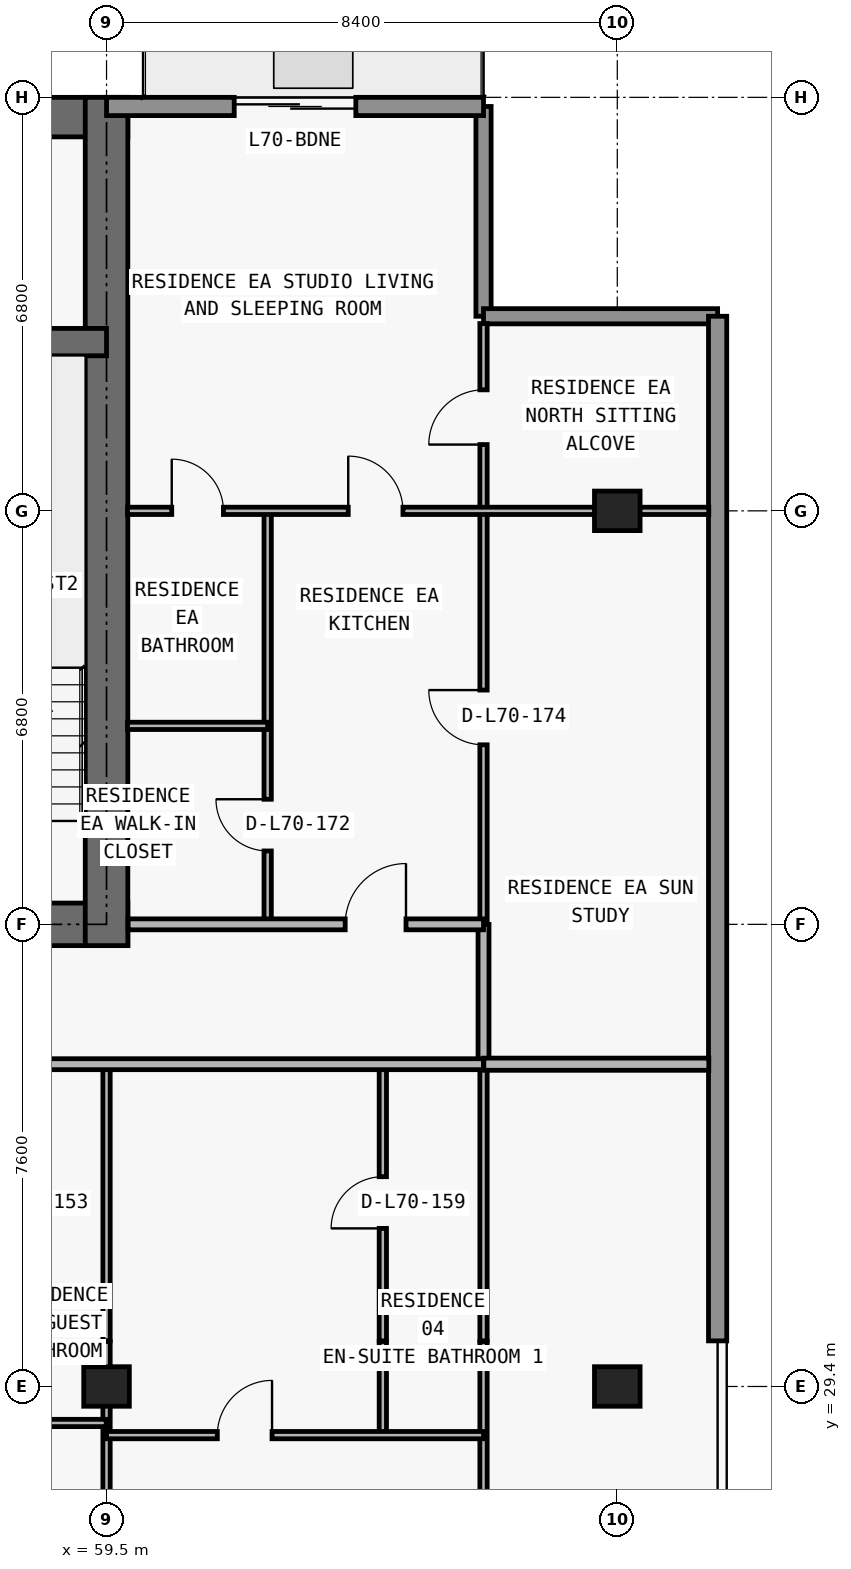
"""IFC4 building model, lengths in metres.
Left out: names, types, materials, properties, quantities, classifications, styles, units other than length and angle.
Written with IfcOpenShell. Run it as: python <this file> out.ifc"""

import sys

from ifc_helpers import new_model, si_unit, direction, frame, frame_2d, origin, origin_2d, place, context, subcontext, project, spatial, rectangle, extrude, element, fill, save


model = new_model("IFC4")
c1 = context("Model", 3, precision=1e-05, world=origin(), true_north=direction((0.0, 1.0)))
c2 = subcontext(c1, "Body", "Model", "MODEL_VIEW")
j1 = project(units=[si_unit("LENGTHUNIT", "METRE"), si_unit("PLANEANGLEUNIT", "RADIAN")], contexts=[c1])
p1 = place(None, origin())
s1 = spatial("IfcSite", under=j1, at=p1, CompositionType="ELEMENT")
p2 = place(p1, origin())
s2 = spatial("IfcBuilding", under=s1, at=p2, CompositionType="ELEMENT")
p3 = place(p2, frame((0.0, 0.0, 249.6)))
s3 = spatial("IfcBuildingStorey", under=s2, at=p3, CompositionType="ELEMENT", Elevation=249.6)
for number, where, z_axis, x_axis in (
    (1, (59.5, 29.4, 0.0), (0.0, 0.0, 1.0), (1.0, 0.0, 0.0)),
    (2, (67.9, 29.4, 0.0), (0.0, 0.0, 1.0), (1.0, 0.0, 0.0)),
    (3, (67.9, 43.8, 0.0), (0.0, 0.0, 1.0), (1.0, 0.0, 0.0)),
):
    element("IfcColumn", number, at=place(p3, frame(where, z_axis=z_axis, x_axis=x_axis)), inside=s3, PredefinedType="COLUMN", context=c2, shape_type="SweptSolid", body=[
        extrude(rectangle(XDim=0.75, YDim=0.65, at=origin_2d()), origin(), (0.0, 0.0, 1.0), 3.05),
    ])
p4 = place(p3, frame((17.95, 37.0, 0.0), z_axis=(0.0, 0.0, 1.0), x_axis=(1.0, 0.0, 0.0)))
e4 = element("IfcWall", 4, at=p4, inside=s3, PredefinedType="SHEAR", context=c2, shape_type="SweptSolid", body=[
    extrude(rectangle(XDim=41.9, YDim=0.7, at=frame_2d((20.95, 0.0))), origin(), (0.0, 0.0, 1.0), 3.05),
])
p5 = place(p4, frame((14.35, 0.0, 0.0)))
e5 = element("IfcOpeningElement", 5, at=p5, cuts=e4, PredefinedType="OPENING", context=c2, shape_type="SweptSolid", body=[
    extrude(rectangle(XDim=1.1, YDim=2.15, at=frame_2d((0.55, 1.075))), frame((0.0, 0.36, 0.0), z_axis=(0.0, -1.0, 0.0), x_axis=(1.0, 0.0, 0.0)), (0.0, 0.0, 1.0), 0.72),
])
p6 = place(p4, frame((6.2, 0.0, 0.0)))
e6 = element("IfcOpeningElement", 6, at=p6, cuts=e4, PredefinedType="OPENING", context=c2, shape_type="SweptSolid", body=[
    extrude(rectangle(XDim=1.05, YDim=2.15, at=frame_2d((0.525, 1.075))), frame((0.0, 0.36, 0.0), z_axis=(0.0, -1.0, 0.0), x_axis=(1.0, 0.0, 0.0)), (0.0, 0.0, 1.0), 0.72),
])
p7 = place(p4, frame((34.7, 0.0, 0.0)))
e7 = element("IfcOpeningElement", 7, at=p7, cuts=e4, PredefinedType="OPENING", context=c2, shape_type="SweptSolid", body=[
    extrude(rectangle(XDim=1.05, YDim=2.15, at=frame_2d((0.525, 1.075))), frame((0.0, 0.36, 0.0), z_axis=(0.0, -1.0, 0.0), x_axis=(1.0, 0.0, 0.0)), (0.0, 0.0, 1.0), 0.72),
])
p8 = place(p4, frame((10.812, 0.0, 0.0)))
e8 = element("IfcOpeningElement", 8, at=p8, cuts=e4, PredefinedType="OPENING", context=c2, shape_type="SweptSolid", body=[
    extrude(rectangle(XDim=1.05, YDim=2.15, at=frame_2d((0.525, 1.075))), frame((0.0, 0.36, 0.0), z_axis=(0.0, -1.0, 0.0), x_axis=(1.0, 0.0, 0.0)), (0.0, 0.0, 1.0), 0.72),
])
p9 = place(p4, frame((24.05, 0.0, 0.0)))
e9 = element("IfcOpeningElement", 9, at=p9, cuts=e4, PredefinedType="OPENING", context=c2, shape_type="SweptSolid", body=[
    extrude(rectangle(XDim=1.05, YDim=2.15, at=frame_2d((0.525, 1.075))), frame((0.0, 0.36, 0.0), z_axis=(0.0, -1.0, 0.0), x_axis=(1.0, 0.0, 0.0)), (0.0, 0.0, 1.0), 0.72),
])
p10 = place(p3, frame((17.95, 50.275, 0.0), z_axis=(0.0, 0.0, 1.0), x_axis=(1.0, 0.0, 0.0)))
e10 = element("IfcWall", 10, at=p10, inside=s3, PredefinedType="SHEAR", context=c2, shape_type="SweptSolid", body=[
    extrude(rectangle(XDim=41.9, YDim=0.65, at=frame_2d((20.95, 0.0))), origin(), (0.0, 0.0, 1.0), 3.05),
])
p11 = place(p3, frame((59.5, 36.65, 0.0), z_axis=(0.0, 0.0, 1.0), x_axis=(0.0, 1.0, 0.0)))
e11 = element("IfcWall", 11, at=p11, inside=s3, PredefinedType="SHEAR", context=c2, shape_type="SweptSolid", body=[
    extrude(rectangle(XDim=13.95, YDim=0.7, at=frame_2d((6.975, 0.0))), origin(), (0.0, 0.0, 1.0), 3.05),
])
p12 = place(p3, frame((18.3, 46.575, 0.0), z_axis=(0.0, 0.0, 1.0), x_axis=(1.0, 0.0, 0.0)))
e12 = element("IfcWall", 12, at=p12, inside=s3, PredefinedType="SHEAR", context=c2, shape_type="SweptSolid", body=[
    extrude(rectangle(XDim=41.2, YDim=0.45, at=frame_2d((20.6, 0.0))), origin(), (0.0, 0.0, 1.0), 3.05),
])
p13 = place(p12, frame((7.575, 0.0, 0.0)))
e13 = element("IfcOpeningElement", 13, at=p13, cuts=e12, PredefinedType="OPENING", context=c2, shape_type="SweptSolid", body=[
    extrude(rectangle(XDim=1.05, YDim=2.15, at=frame_2d((0.525, 1.075))), frame((0.0, 0.235, 0.0), z_axis=(0.0, -1.0, 0.0), x_axis=(1.0, 0.0, 0.0)), (0.0, 0.0, 1.0), 0.47),
])
p14 = place(p12, frame((32.625, 0.0, 0.0)))
e14 = element("IfcOpeningElement", 14, at=p14, cuts=e12, PredefinedType="OPENING", context=c2, shape_type="SweptSolid", body=[
    extrude(rectangle(XDim=1.05, YDim=2.15, at=frame_2d((0.525, 1.075))), frame((0.0, 0.235, 0.0), z_axis=(0.0, -1.0, 0.0), x_axis=(1.0, 0.0, 0.0)), (0.0, 0.0, 1.0), 0.47),
])
p15 = place(p3, frame((65.7, 50.45, 0.0), z_axis=(0.0, 0.0, 1.0), x_axis=(0.0, -1.0, 0.0)))
e15 = element("IfcWall", 15, at=p15, inside=s3, PredefinedType="ELEMENTEDWALL", context=c2, shape_type="SweptSolid", body=[
    extrude(rectangle(XDim=3.45, YDim=0.25, at=frame_2d((1.725, 0.0))), origin(), (0.0, 0.0, 1.0), 3.05),
])
p16 = place(p3, frame((65.7, 47.0, 0.0), z_axis=(0.0, 0.0, 1.0), x_axis=(1.0, 0.0, 0.0)))
e16 = element("IfcWall", 16, at=p16, inside=s3, PredefinedType="ELEMENTEDWALL", context=c2, shape_type="SweptSolid", body=[
    extrude(rectangle(XDim=3.85, YDim=0.25, at=frame_2d((1.925, 0.0))), origin(), (0.0, 0.0, 1.0), 3.05),
])
p17 = place(p3, frame((69.55, 47.0, 0.0), z_axis=(0.0, 0.0, 1.0), x_axis=(0.0, -1.0, 0.0)))
e17 = element("IfcWall", 17, at=p17, inside=s3, PredefinedType="STANDARD", context=c2, shape_type="SweptSolid", body=[
    extrude(rectangle(XDim=16.85, YDim=0.3, at=frame_2d((8.425, 0.0))), origin(), (0.0, 0.0, 1.0), 3.05),
])
p18 = place(p3, frame((59.5, 50.45, 0.0), z_axis=(0.0, 0.0, 1.0), x_axis=(1.0, 0.0, 0.0)))
e18 = element("IfcWall", 18, at=p18, inside=s3, PredefinedType="STANDARD", context=c2, shape_type="SweptSolid", body=[
    extrude(rectangle(XDim=6.2, YDim=0.3, at=frame_2d((3.1, 0.0))), origin(), (0.0, 0.0, 1.0), 3.05),
])
p19 = place(p18, frame((2.1, 0.0, 0.0)))
e19 = element("IfcOpeningElement", 19, at=p19, cuts=e18, PredefinedType="OPENING", context=c2, shape_type="SweptSolid", body=[
    extrude(rectangle(XDim=2.0, YDim=2.3, at=frame_2d((1.0, 1.15))), frame((0.0, 0.16, 0.0), z_axis=(0.0, -1.0, 0.0), x_axis=(1.0, 0.0, 0.0)), (0.0, 0.0, 1.0), 0.32),
])
p20 = place(p3, frame((59.5, 13.34, 0.0), z_axis=(0.0, 0.0, 1.0), x_axis=(0.0, 1.0, 0.0)))
e20 = element("IfcWall", 20, at=p20, inside=s3, PredefinedType="PARTITIONING", context=c2, shape_type="SweptSolid", body=[
    extrude(rectangle(XDim=16.8, YDim=0.12, at=frame_2d((8.4, 0.0))), origin(), (0.0, 0.0, 1.0), 2.263),
])
p21 = place(p20, frame((12.61, 0.0, 0.0)))
e21 = element("IfcOpeningElement", 21, at=p21, cuts=e20, PredefinedType="OPENING", context=c2, shape_type="SweptSolid", body=[
    extrude(rectangle(XDim=0.9, YDim=2.15, at=frame_2d((0.45, 1.075))), frame((0.0, 0.07, 0.0), z_axis=(0.0, -1.0, 0.0), x_axis=(1.0, 0.0, 0.0)), (0.0, 0.0, 1.0), 0.14),
])
p22 = place(p3, frame((59.5, 30.15, 0.0), z_axis=(0.0, 0.0, 1.0), x_axis=(0.0, 1.0, 0.0)))
e22 = element("IfcWall", 22, at=p22, inside=s3, PredefinedType="PARTITIONING", context=c2, shape_type="SweptSolid", body=[
    extrude(rectangle(XDim=4.55, YDim=0.12, at=frame_2d((2.275, 0.0))), origin(), (0.0, 0.0, 1.0), 2.263),
])
p23 = place(p3, frame((62.15, 37.0, 0.0), z_axis=(0.0, 0.0, 1.0), x_axis=(0.0, 1.0, 0.0)))
e23 = element("IfcWall", 23, at=p23, inside=s3, PredefinedType="PARTITIONING", context=c2, shape_type="SweptSolid", body=[
    extrude(rectangle(XDim=6.8, YDim=0.12, at=frame_2d((3.4, 0.0))), origin(), (0.0, 0.0, 1.0), 3.05),
])
p24 = place(p23, frame((1.207, 0.0, 0.0)))
e24 = element("IfcOpeningElement", 24, at=p24, cuts=e23, PredefinedType="OPENING", context=c2, shape_type="SweptSolid", body=[
    extrude(rectangle(XDim=0.85, YDim=2.1, at=frame_2d((0.425, 1.05))), frame((0.0, 0.07, 0.0), z_axis=(0.0, -1.0, 0.0), x_axis=(1.0, 0.0, 0.0)), (0.0, 0.0, 1.0), 0.14),
])
p25 = place(p3, frame((64.044, 28.6, 0.0), z_axis=(0.0, 0.0, 1.0), x_axis=(0.0, 1.0, 0.0)))
e25 = element("IfcWall", 25, at=p25, inside=s3, PredefinedType="PARTITIONING", context=c2, shape_type="SweptSolid", body=[
    extrude(rectangle(XDim=1.54, YDim=0.12, at=frame_2d((0.77, 0.0))), origin(), (0.0, 0.0, 1.0), 3.05),
])
p26 = place(p3, frame((64.044, 30.15, 0.0), z_axis=(0.0, 0.0, 1.0), x_axis=(0.0, 1.0, 0.0)))
e26 = element("IfcWall", 26, at=p26, inside=s3, PredefinedType="PARTITIONING", context=c2, shape_type="SweptSolid", body=[
    extrude(rectangle(XDim=4.55, YDim=0.12, at=frame_2d((2.275, 0.0))), origin(), (0.0, 0.0, 1.0), 3.05),
])
p27 = place(p26, frame((1.85, 0.0, 0.0)))
e27 = element("IfcOpeningElement", 27, at=p27, cuts=e26, PredefinedType="OPENING", context=c2, shape_type="SweptSolid", body=[
    extrude(rectangle(XDim=0.85, YDim=2.1, at=frame_2d((0.425, 1.05))), frame((0.0, 0.07, 0.0), z_axis=(0.0, -1.0, 0.0), x_axis=(1.0, 0.0, 0.0)), (0.0, 0.0, 1.0), 0.14),
])
p28 = place(p3, frame((65.7, 13.42, 0.0), z_axis=(0.0, 0.0, 1.0), x_axis=(0.0, 1.0, 0.0)))
e28 = element("IfcWall", 28, at=p28, inside=s3, PredefinedType="PARTITIONING", context=c2, shape_type="SweptSolid", body=[
    extrude(rectangle(XDim=16.72, YDim=0.12, at=frame_2d((8.36, 0.0))), origin(), (0.0, 0.0, 1.0), 2.629),
])
p29 = place(p28, frame((12.53, 0.0, 0.0)))
e29 = element("IfcOpeningElement", 29, at=p29, cuts=e28, PredefinedType="OPENING", context=c2, shape_type="SweptSolid", body=[
    extrude(rectangle(XDim=0.9, YDim=2.15, at=frame_2d((0.45, 1.075))), frame((0.0, 0.07, 0.0), z_axis=(0.0, -1.0, 0.0), x_axis=(1.0, 0.0, 0.0)), (0.0, 0.0, 1.0), 0.14),
])
p30 = place(p3, frame((65.7, 30.15, 0.0), z_axis=(0.0, 0.0, 1.0), x_axis=(0.0, 1.0, 0.0)))
e30 = element("IfcWall", 30, at=p30, inside=s3, PredefinedType="PARTITIONING", context=c2, shape_type="SweptSolid", body=[
    extrude(rectangle(XDim=4.55, YDim=0.12, at=frame_2d((2.275, 0.0))), origin(), (0.0, 0.0, 1.0), 2.629),
])
p31 = place(p3, frame((65.7, 34.705, 0.0), z_axis=(0.0, 0.0, 1.0), x_axis=(0.0, 1.0, 0.0)))
e31 = element("IfcWall", 31, at=p31, inside=s3, PredefinedType="PARTITIONING", context=c2, shape_type="SweptSolid", body=[
    extrude(rectangle(XDim=2.295, YDim=0.18, at=frame_2d((1.147, 0.0))), origin(), (0.0, 0.0, 1.0), 2.629),
])
p32 = place(p3, frame((65.7, 37.005, 0.0), z_axis=(0.0, 0.0, 1.0), x_axis=(0.0, 1.0, 0.0)))
e32 = element("IfcWall", 32, at=p32, inside=s3, PredefinedType="PARTITIONING", context=c2, shape_type="SweptSolid", body=[
    extrude(rectangle(XDim=9.875, YDim=0.12, at=frame_2d((4.938, 0.0))), origin(), (0.0, 0.0, 1.0), 2.629),
])
p33 = place(p32, frame((2.948, 0.0, 0.0)))
e33 = element("IfcOpeningElement", 33, at=p33, cuts=e32, PredefinedType="OPENING", context=c2, shape_type="SweptSolid", body=[
    extrude(rectangle(XDim=0.9, YDim=2.15, at=frame_2d((0.45, 1.075))), frame((0.0, 0.07, 0.0), z_axis=(0.0, -1.0, 0.0), x_axis=(1.0, 0.0, 0.0)), (0.0, 0.0, 1.0), 0.14),
])
p34 = place(p32, frame((7.885, 0.0, 0.0)))
e34 = element("IfcOpeningElement", 34, at=p34, cuts=e32, PredefinedType="OPENING", context=c2, shape_type="SweptSolid", body=[
    extrude(rectangle(XDim=0.9, YDim=2.15, at=frame_2d((0.45, 1.075))), frame((0.0, 0.07, 0.0), z_axis=(0.0, -1.0, 0.0), x_axis=(1.0, 0.0, 0.0)), (0.0, 0.0, 1.0), 0.14),
])
p35 = place(p3, frame((59.5, 28.6, 0.0), z_axis=(0.0, 0.0, 1.0), x_axis=(1.0, 0.0, 0.0)))
e35 = element("IfcWall", 35, at=p35, inside=s3, PredefinedType="PARTITIONING", context=c2, shape_type="SweptSolid", body=[
    extrude(rectangle(XDim=6.2, YDim=0.12, at=frame_2d((3.1, 0.0))), origin(), (0.0, 0.0, 1.0), 3.05),
])
p36 = place(p35, frame((1.822, 0.0, 0.0)))
e36 = element("IfcOpeningElement", 36, at=p36, cuts=e35, PredefinedType="OPENING", context=c2, shape_type="SweptSolid", body=[
    extrude(rectangle(XDim=0.9, YDim=2.15, at=frame_2d((0.45, 1.075))), frame((0.0, 0.07, 0.0), z_axis=(0.0, -1.0, 0.0), x_axis=(1.0, 0.0, 0.0)), (0.0, 0.0, 1.0), 0.14),
])
p37 = place(p3, frame((51.32, 28.8, 0.0), z_axis=(0.0, 0.0, 1.0), x_axis=(1.0, 0.0, 0.0)))
e37 = element("IfcWall", 37, at=p37, inside=s3, PredefinedType="PARTITIONING", context=c2, shape_type="SweptSolid", body=[
    extrude(rectangle(XDim=8.175, YDim=0.12, at=frame_2d((4.087, 0.0))), origin(), (0.0, 0.0, 1.0), 3.05),
])
p38 = place(p37, frame((1.204, 0.0, 0.0)))
e38 = element("IfcOpeningElement", 38, at=p38, cuts=e37, PredefinedType="OPENING", context=c2, shape_type="SweptSolid", body=[
    extrude(rectangle(XDim=0.9, YDim=2.15, at=frame_2d((0.45, 1.075))), frame((0.0, 0.07, 0.0), z_axis=(0.0, -1.0, 0.0), x_axis=(1.0, 0.0, 0.0)), (0.0, 0.0, 1.0), 0.14),
])
p39 = place(p3, frame((26.7, 34.7, 0.0), z_axis=(0.0, 0.0, 1.0), x_axis=(1.0, 0.0, 0.0)))
e39 = element("IfcWall", 39, at=p39, inside=s3, PredefinedType="PARTITIONING", context=c2, shape_type="SweptSolid", body=[
    extrude(rectangle(XDim=39.0, YDim=0.18, at=frame_2d((19.5, 0.0))), origin(), (0.0, 0.0, 1.0), 3.05),
])
p40 = place(p39, frame((2.827, 0.0, 0.0)))
e40 = element("IfcOpeningElement", 40, at=p40, cuts=e39, PredefinedType="OPENING", context=c2, shape_type="SweptSolid", body=[
    extrude(rectangle(XDim=1.0, YDim=2.2, at=frame_2d((0.5, 1.1))), frame((0.0, 0.1, 0.0), z_axis=(0.0, -1.0, 0.0), x_axis=(1.0, 0.0, 0.0)), (0.0, 0.0, 1.0), 0.2),
])
p41 = place(p39, frame((27.27, 0.0, 0.0)))
e41 = element("IfcOpeningElement", 41, at=p41, cuts=e39, PredefinedType="OPENING", context=c2, shape_type="SweptSolid", body=[
    extrude(rectangle(XDim=1.0, YDim=2.2, at=frame_2d((0.5, 1.1))), frame((0.0, 0.1, 0.0), z_axis=(0.0, -1.0, 0.0), x_axis=(1.0, 0.0, 0.0)), (0.0, 0.0, 1.0), 0.2),
])
p42 = place(p3, frame((65.705, 34.7, 0.0), z_axis=(0.0, 0.0, 1.0), x_axis=(1.0, 0.0, 0.0)))
e42 = element("IfcWall", 42, at=p42, inside=s3, PredefinedType="PARTITIONING", context=c2, shape_type="SweptSolid", body=[
    extrude(rectangle(XDim=3.7, YDim=0.2, at=frame_2d((1.85, 0.0))), origin(), (0.0, 0.0, 1.0), 3.05),
])
p43 = place(p3, frame((59.855, 37.0, 0.0), z_axis=(0.0, 0.0, 1.0), x_axis=(1.0, 0.0, 0.0)))
e43 = element("IfcWall", 43, at=p43, inside=s3, PredefinedType="PARTITIONING", context=c2, shape_type="SweptSolid", body=[
    extrude(rectangle(XDim=5.845, YDim=0.18, at=frame_2d((2.922, 0.0))), origin(), (0.0, 0.0, 1.0), 3.05),
])
p44 = place(p43, frame((3.57, 0.0, 0.0)))
e44 = element("IfcOpeningElement", 44, at=p44, cuts=e43, PredefinedType="OPENING", context=c2, shape_type="SweptSolid", body=[
    extrude(rectangle(XDim=1.0, YDim=2.2, at=frame_2d((0.5, 1.1))), frame((0.0, 0.1, 0.0), z_axis=(0.0, -1.0, 0.0), x_axis=(1.0, 0.0, 0.0)), (0.0, 0.0, 1.0), 0.2),
])
p45 = place(p3, frame((59.845, 40.264, 0.0), z_axis=(0.0, 0.0, 1.0), x_axis=(1.0, 0.0, 0.0)))
e45 = element("IfcWall", 45, at=p45, inside=s3, PredefinedType="PARTITIONING", context=c2, shape_type="SweptSolid", body=[
    extrude(rectangle(XDim=2.305, YDim=0.12, at=frame_2d((1.152, 0.0))), origin(), (0.0, 0.0, 1.0), 3.05),
])
p46 = place(p3, frame((59.845, 43.8, 0.0), z_axis=(0.0, 0.0, 1.0), x_axis=(1.0, 0.0, 0.0)))
e46 = element("IfcWall", 46, at=p46, inside=s3, PredefinedType="PARTITIONING", context=c2, shape_type="SweptSolid", body=[
    extrude(rectangle(XDim=9.56, YDim=0.12, at=frame_2d((4.78, 0.0))), origin(), (0.0, 0.0, 1.0), 2.418),
])
p47 = place(p46, frame((3.63, 0.0, 0.0)))
e47 = element("IfcOpeningElement", 47, at=p47, cuts=e46, PredefinedType="OPENING", context=c2, shape_type="SweptSolid", body=[
    extrude(rectangle(XDim=0.9, YDim=2.15, at=frame_2d((0.45, 1.075))), frame((0.0, 0.07, 0.0), z_axis=(0.0, -1.0, 0.0), x_axis=(1.0, 0.0, 0.0)), (0.0, 0.0, 1.0), 0.14),
])
p48 = place(p46, frame((0.728, 0.0, 0.0)))
e48 = element("IfcOpeningElement", 48, at=p48, cuts=e46, PredefinedType="OPENING", context=c2, shape_type="SweptSolid", body=[
    extrude(rectangle(XDim=0.85, YDim=2.1, at=frame_2d((0.425, 1.05))), frame((0.0, 0.07, 0.0), z_axis=(0.0, -1.0, 0.0), x_axis=(1.0, 0.0, 0.0)), (0.0, 0.0, 1.0), 0.14),
])
p49 = place(p19, origin())
e49 = element("IfcDoor", 49, at=p49, inside=s3, OperationType="DOUBLE_DOOR_SLIDING", PredefinedType="DOOR", context=c2, shape_type="SweptSolid", body=[
    extrude(rectangle(XDim=2.0, YDim=2.3, at=frame_2d((1.0, 1.15))), frame((0.0, 0.025, 0.0), z_axis=(0.0, -1.0, 0.0), x_axis=(1.0, 0.0, 0.0)), (0.0, 0.0, 1.0), 0.05),
])
fill(e19, e49)
p50 = place(p36, origin())
e50 = element("IfcDoor", 50, at=p50, inside=s3, OperationType="SINGLE_SWING_RIGHT", PredefinedType="DOOR", context=c2, shape_type="SweptSolid", body=[
    extrude(rectangle(XDim=0.9, YDim=2.15, at=frame_2d((0.45, 1.075))), frame((0.0, 0.025, 0.0), z_axis=(0.0, -1.0, 0.0), x_axis=(1.0, 0.0, 0.0)), (0.0, 0.0, 1.0), 0.05),
])
fill(e36, e50)
p51 = place(p27, origin())
e51 = element("IfcDoor", 51, at=p51, inside=s3, OperationType="SINGLE_SWING_LEFT", PredefinedType="DOOR", context=c2, shape_type="SweptSolid", body=[
    extrude(rectangle(XDim=0.85, YDim=2.1, at=frame_2d((0.425, 1.05))), frame((0.0, 0.025, 0.0), z_axis=(0.0, -1.0, 0.0), x_axis=(1.0, 0.0, 0.0)), (0.0, 0.0, 1.0), 0.05),
])
fill(e27, e51)
p52 = place(p44, origin())
e52 = element("IfcDoor", 52, at=p52, inside=s3, OperationType="SINGLE_SWING_RIGHT", PredefinedType="DOOR", context=c2, shape_type="SweptSolid", body=[
    extrude(rectangle(XDim=1.0, YDim=2.2, at=frame_2d((0.5, 1.1))), frame((0.0, 0.025, 0.0), z_axis=(0.0, -1.0, 0.0), x_axis=(1.0, 0.0, 0.0)), (0.0, 0.0, 1.0), 0.05),
])
fill(e44, e52)
p53 = place(p47, origin())
e53 = element("IfcDoor", 53, at=p53, inside=s3, OperationType="SINGLE_SWING_LEFT", PredefinedType="DOOR", context=c2, shape_type="SweptSolid", body=[
    extrude(rectangle(XDim=0.9, YDim=2.15, at=frame_2d((0.45, 1.075))), frame((0.0, 0.025, 0.0), z_axis=(0.0, -1.0, 0.0), x_axis=(1.0, 0.0, 0.0)), (0.0, 0.0, 1.0), 0.05),
])
fill(e47, e53)
p54 = place(p24, origin())
e54 = element("IfcDoor", 54, at=p54, inside=s3, OperationType="SINGLE_SWING_RIGHT", PredefinedType="DOOR", context=c2, shape_type="SweptSolid", body=[
    extrude(rectangle(XDim=0.85, YDim=2.1, at=frame_2d((0.425, 1.05))), frame((0.0, 0.025, 0.0), z_axis=(0.0, -1.0, 0.0), x_axis=(1.0, 0.0, 0.0)), (0.0, 0.0, 1.0), 0.05),
])
fill(e24, e54)
p55 = place(p48, origin())
e55 = element("IfcDoor", 55, at=p55, inside=s3, OperationType="SINGLE_SWING_LEFT", PredefinedType="DOOR", context=c2, shape_type="SweptSolid", body=[
    extrude(rectangle(XDim=0.85, YDim=2.1, at=frame_2d((0.425, 1.05))), frame((0.0, 0.025, 0.0), z_axis=(0.0, -1.0, 0.0), x_axis=(1.0, 0.0, 0.0)), (0.0, 0.0, 1.0), 0.05),
])
fill(e48, e55)
p56 = place(p33, origin())
e56 = element("IfcDoor", 56, at=p56, inside=s3, OperationType="SINGLE_SWING_RIGHT", PredefinedType="DOOR", context=c2, shape_type="SweptSolid", body=[
    extrude(rectangle(XDim=0.9, YDim=2.15, at=frame_2d((0.45, 1.075))), frame((0.0, 0.025, 0.0), z_axis=(0.0, -1.0, 0.0), x_axis=(1.0, 0.0, 0.0)), (0.0, 0.0, 1.0), 0.05),
])
fill(e33, e56)
p57 = place(p34, origin())
e57 = element("IfcDoor", 57, at=p57, inside=s3, OperationType="SINGLE_SWING_LEFT", PredefinedType="DOOR", context=c2, shape_type="SweptSolid", body=[
    extrude(rectangle(XDim=0.9, YDim=2.15, at=frame_2d((0.45, 1.075))), frame((0.0, 0.025, 0.0), z_axis=(0.0, -1.0, 0.0), x_axis=(1.0, 0.0, 0.0)), (0.0, 0.0, 1.0), 0.05),
])
fill(e34, e57)
save(model, sys.argv[1])
